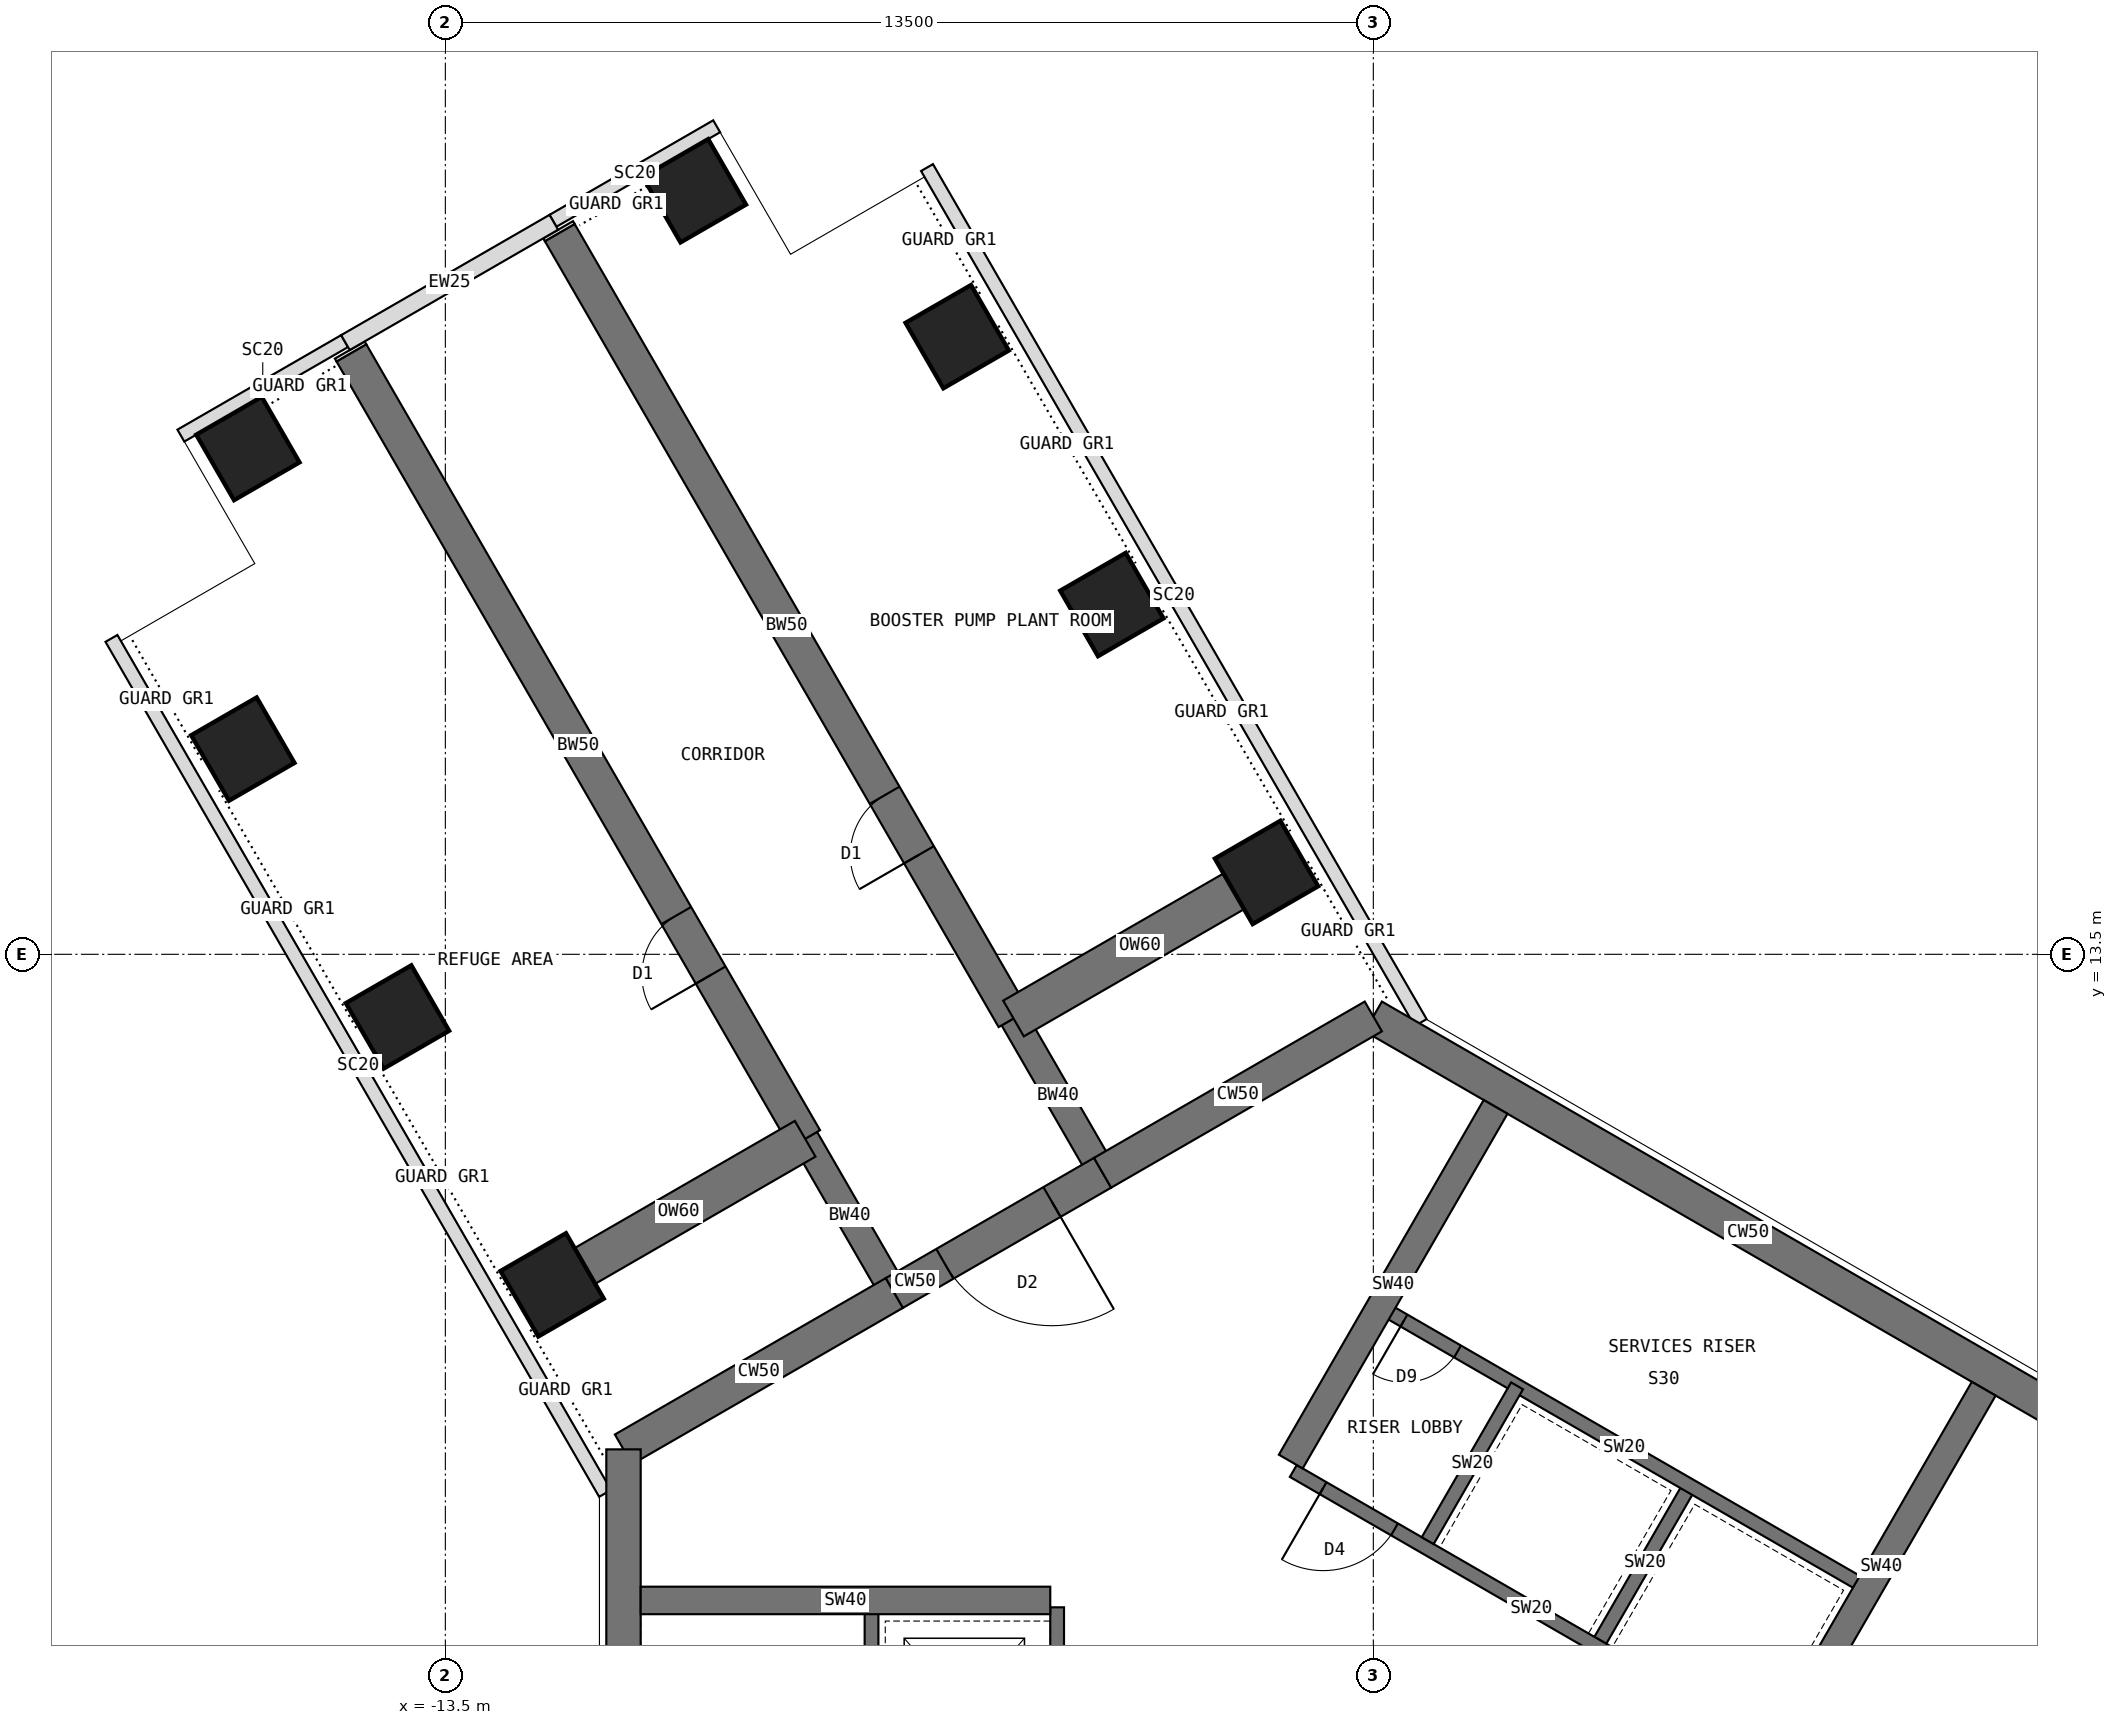
"""IFC4 building model, lengths in metres.
Left out: names, types, materials, properties, quantities, classifications, styles, units other than length and angle.
Written with IfcOpenShell. Run it as: python <this file> out.ifc"""

import sys

from ifc_helpers import new_model, si_unit, direction, frame, frame_2d, origin, origin_2d, place, context, subcontext, project, spatial, rectangle, extrude, element, fill, save


model = new_model("IFC4")
c1 = context("Model", 3, precision=1e-05, world=origin(), true_north=direction((0.0, 1.0)))
c2 = subcontext(c1, "Body", "Model", "MODEL_VIEW")
j1 = project(units=[si_unit("LENGTHUNIT", "METRE"), si_unit("PLANEANGLEUNIT", "RADIAN")], contexts=[c1])
p1 = place(None, origin())
s1 = spatial("IfcSite", under=j1, at=p1, CompositionType="ELEMENT")
p2 = place(p1, origin())
s2 = spatial("IfcBuilding", under=s1, at=p2, CompositionType="ELEMENT")
p3 = place(p2, frame((0.0, 0.0, 238.5)))
s3 = spatial("IfcBuildingStorey", under=s2, at=p3, CompositionType="ELEMENT", Elevation=238.5)
p4 = place(p3, frame((10.908, 6.298, 0.0), z_axis=(0.0, 0.0, 1.0), x_axis=(-0.866021940709, 0.500005998175, 0.0)))
e1 = element("IfcWall", 1, at=p4, inside=s3, PredefinedType="SHEAR", context=c2, shape_type="SweptSolid", body=[
    extrude(rectangle(XDim=12.596, YDim=0.5, at=frame_2d((6.298, 0.0))), origin(), (0.0, 0.0, 1.0), 5.0),
])
p5 = place(p3, frame((0.0, 12.596, 0.0), z_axis=(0.0, 0.0, 1.0), x_axis=(-0.866011268655, -0.500024481964, 0.0)))
e2 = element("IfcWall", 2, at=p5, inside=s3, PredefinedType="SHEAR", context=c2, shape_type="SweptSolid", body=[
    extrude(rectangle(XDim=4.548, YDim=0.5, at=frame_2d((2.274, 0.0))), origin(), (0.0, 0.0, 1.0), 5.0),
])
p6 = place(p3, frame((-3.939, 10.322, 0.0), z_axis=(0.0, 0.0, 1.0), x_axis=(-0.866019471182, -0.500010275428, 0.0)))
e3 = element("IfcWall", 3, at=p6, inside=s3, PredefinedType="SHEAR", context=c2, shape_type="SweptSolid", body=[
    extrude(rectangle(XDim=3.5, YDim=0.5, at=frame_2d((1.75, 0.0))), origin(), (0.0, 0.0, 1.0), 5.0),
])
p7 = place(p6, frame((0.85, 0.0, 0.0)))
e4 = element("IfcOpeningElement", 4, at=p7, cuts=e3, PredefinedType="OPENING", context=c2, shape_type="SweptSolid", body=[
    extrude(rectangle(XDim=1.8, YDim=2.1, at=frame_2d((0.9, 1.05))), frame((0.0, 0.26, 0.0), z_axis=(0.0, -1.0, 0.0), x_axis=(1.0, 0.0, 0.0)), (0.0, 0.0, 1.0), 0.52),
])
p8 = place(p3, frame((-6.97, 8.572, 0.0), z_axis=(0.0, 0.0, 1.0), x_axis=(-0.866034513004, -0.499984222037, 0.0)))
e5 = element("IfcWall", 5, at=p8, inside=s3, PredefinedType="SHEAR", context=c2, shape_type="SweptSolid", body=[
    extrude(rectangle(XDim=4.548, YDim=0.5, at=frame_2d((2.274, 0.0))), origin(), (0.0, 0.0, 1.0), 5.0),
])
p9 = place(p3, frame((-10.908, 6.298, 0.0), z_axis=(0.0, 0.0, 1.0), x_axis=(0.0, -1.0, 0.0)))
e6 = element("IfcWall", 6, at=p9, inside=s3, PredefinedType="SHEAR", context=c2, shape_type="SweptSolid", body=[
    extrude(rectangle(XDim=12.596, YDim=0.5, at=frame_2d((6.298, 0.0))), origin(), (0.0, 0.0, 1.0), 5.0),
])
p10 = place(p3, frame((-6.97, 8.572, 0.0), z_axis=(0.0, 0.0, 1.0), x_axis=(-0.499988811324, 0.866031863473, 0.0)))
e7 = element("IfcWall", 7, at=p10, inside=s3, PredefinedType="SHEAR", context=c2, shape_type="SweptSolid", body=[
    extrude(rectangle(XDim=2.592, YDim=0.4, at=frame_2d((1.296, 0.0))), origin(), (0.0, 0.0, 1.0), 5.0),
])
p11 = place(p3, frame((-8.266, 10.816, 0.0), z_axis=(0.0, 0.0, 1.0), x_axis=(-0.499996231654, 0.866027579429, 0.0)))
e8 = element("IfcWall", 8, at=p11, inside=s3, PredefinedType="SHEAR", context=c2, shape_type="SweptSolid", body=[
    extrude(rectangle(XDim=13.2, YDim=0.5, at=frame_2d((6.6, 0.0))), origin(), (0.0, 0.0, 1.0), 5.0),
])
p12 = place(p11, frame((2.75, 0.0, 0.0)))
e9 = element("IfcOpeningElement", 9, at=p12, cuts=e8, PredefinedType="OPENING", context=c2, shape_type="SweptSolid", body=[
    extrude(rectangle(XDim=1.0, YDim=2.1, at=frame_2d((0.5, 1.05))), frame((0.0, 0.26, 0.0), z_axis=(0.0, -1.0, 0.0), x_axis=(1.0, 0.0, 0.0)), (0.0, 0.0, 1.0), 0.52),
])
p13 = place(p3, frame((-3.939, 10.322, 0.0), z_axis=(0.0, 0.0, 1.0), x_axis=(-0.499918158782, 0.866072649678, 0.0)))
e10 = element("IfcWall", 10, at=p13, inside=s3, PredefinedType="SHEAR", context=c2, shape_type="SweptSolid", body=[
    extrude(rectangle(XDim=2.592, YDim=0.4, at=frame_2d((1.296, 0.0))), origin(), (0.0, 0.0, 1.0), 5.0),
])
p14 = place(p3, frame((-5.234, 12.566, 0.0), z_axis=(0.0, 0.0, 1.0), x_axis=(-0.500010103361, 0.866019570528, 0.0)))
e11 = element("IfcWall", 11, at=p14, inside=s3, PredefinedType="SHEAR", context=c2, shape_type="SweptSolid", body=[
    extrude(rectangle(XDim=13.2, YDim=0.5, at=frame_2d((6.6, 0.0))), origin(), (0.0, 0.0, 1.0), 5.0),
])
p15 = place(p14, frame((2.75, 0.0, 0.0)))
e12 = element("IfcOpeningElement", 12, at=p15, cuts=e11, PredefinedType="OPENING", context=c2, shape_type="SweptSolid", body=[
    extrude(rectangle(XDim=1.0, YDim=2.1, at=frame_2d((0.5, 1.05))), frame((0.0, 0.26, 0.0), z_axis=(0.0, -1.0, 0.0), x_axis=(1.0, 0.0, 0.0)), (0.0, 0.0, 1.0), 0.52),
])
for number, where, z_axis, x_axis in (
    (13, (-11.946, 8.691, 0.0), (0.0, 0.0, 1.0), (0.866, 0.5, 0.0)),
    (14, (-1.554, 14.691, 0.0), (0.0, 0.0, 1.0), (0.866, 0.5, 0.0)),
    (15, (-14.196, 12.588, 0.0), (0.0, 0.0, 1.0), (0.866, 0.5, 0.0)),
    (16, (-3.804, 18.588, 0.0), (0.0, 0.0, 1.0), (0.866, 0.5, 0.0)),
    (17, (-16.446, 16.486, 0.0), (0.0, 0.0, 1.0), (0.866, 0.5, 0.0)),
    (18, (-6.054, 22.486, 0.0), (0.0, 0.0, 1.0), (0.866, 0.5, 0.0)),
    (19, (-16.373, 20.858, 0.0), (0.0, 0.0, 1.0), (0.866, 0.5, 0.0)),
    (20, (-9.877, 24.608, 0.0), (0.0, 0.0, 1.0), (0.866, 0.5, 0.0)),
):
    element("IfcColumn", number, at=place(p3, frame(where, z_axis=z_axis, x_axis=x_axis)), inside=s3, PredefinedType="COLUMN", context=c2, shape_type="SweptSolid", body=[
        extrude(rectangle(XDim=1.1, YDim=1.1, at=origin_2d()), origin(), (0.0, 0.0, 1.0), 5.0),
    ])
for number, where, z_axis, x_axis in (
    (21, (-8.266, 10.816, 0.0), (0.0, 0.0, 1.0), (-0.866, -0.5, 0.0)),
    (22, (-5.234, 12.566, 0.0), (0.0, 0.0, 1.0), (0.866, 0.5, 0.0)),
):
    element("IfcWall", number, at=place(p3, frame(where, z_axis=z_axis, x_axis=x_axis)), inside=s3, PredefinedType="SHEAR", context=c2, shape_type="SweptSolid", body=[
        extrude(rectangle(XDim=4.25, YDim=0.6, at=frame_2d((2.125, 0.0))), origin(), (0.0, 0.0, 1.0), 5.0),
    ])
p16 = place(p3, frame((-11.176, 5.657, 0.0), z_axis=(0.0, 0.0, 1.0), x_axis=(-0.500002020472, 0.866024237261, 0.0)))
e23 = element("IfcWall", 23, at=p16, inside=s3, PredefinedType="USERDEFINED", context=c2, shape_type="SweptSolid", body=[
    extrude(rectangle(XDim=14.363, YDim=0.2, at=frame_2d((7.181, 0.0))), origin(), (0.0, 0.0, 1.0), 4.8),
])
p17 = place(p3, frame((-6.493, 24.946, 0.0), z_axis=(0.0, 0.0, 1.0), x_axis=(0.499994660107, -0.866028486751, 0.0)))
e24 = element("IfcWall", 24, at=p17, inside=s3, PredefinedType="USERDEFINED", context=c2, shape_type="SweptSolid", body=[
    extrude(rectangle(XDim=14.363, YDim=0.2, at=frame_2d((7.182, 0.0))), origin(), (0.0, 0.0, 1.0), 4.8),
])
p18 = place(p3, frame((-9.553, 25.546, 0.0), z_axis=(0.0, 0.0, 1.0), x_axis=(-0.866027397988, -0.499996545922, 0.0)))
e25 = element("IfcWall", 25, at=p18, inside=s3, PredefinedType="USERDEFINED", context=c2, shape_type="SweptSolid", body=[
    extrude(rectangle(XDim=2.75, YDim=0.2, at=frame_2d((1.375, 0.0))), origin(), (0.0, 0.0, 1.0), 4.8),
])
p19 = place(p3, frame((-11.922, 24.149, 0.0), z_axis=(0.0, 0.0, 1.0), x_axis=(-0.866036909293, -0.499980071345, 0.0)))
e26 = element("IfcWall", 26, at=p19, inside=s3, PredefinedType="STANDARD", context=c2, shape_type="SweptSolid", body=[
    extrude(rectangle(XDim=3.5, YDim=0.25, at=frame_2d((1.75, 0.0))), origin(), (0.0, 0.0, 1.0), 4.8),
])
p20 = place(p3, frame((-14.966, 22.421, 0.0), z_axis=(0.0, 0.0, 1.0), x_axis=(-0.866027397988, -0.499996545922, 0.0)))
e27 = element("IfcWall", 27, at=p20, inside=s3, PredefinedType="USERDEFINED", context=c2, shape_type="SweptSolid", body=[
    extrude(rectangle(XDim=2.75, YDim=0.2, at=frame_2d((1.375, 0.0))), origin(), (0.0, 0.0, 1.0), 4.8),
])
p21 = place(p3, frame((-14.865, 22.248, 0.0), z_axis=(0.0, 0.0, 1.0), x_axis=(-0.500844580232, 0.86553723574, 0.0)))
e28 = element("IfcWall", 28, at=p21, inside=s3, PredefinedType="PARTITIONING", context=c2, shape_type="SweptSolid", body=[
    extrude(rectangle(XDim=0.05, YDim=0.5, at=frame_2d((0.025, 0.0))), origin(), (0.0, 0.0, 1.0), 4.8),
])
p22 = place(p3, frame((-11.834, 23.998, 0.0), z_axis=(0.0, 0.0, 1.0), x_axis=(-0.497188445666, 0.867642581652, 0.0)))
e29 = element("IfcWall", 29, at=p22, inside=s3, PredefinedType="PARTITIONING", context=c2, shape_type="SweptSolid", body=[
    extrude(rectangle(XDim=0.05, YDim=0.5, at=frame_2d((0.025, 0.0))), origin(), (0.0, 0.0, 1.0), 4.8),
])
p23 = place(p3, frame((5.764, 1.984, 0.0), z_axis=(0.0, 0.0, 1.0), x_axis=(-0.866026010844, 0.49999894854, 0.0)))
e30 = element("IfcWall", 30, at=p23, inside=s3, PredefinedType="SHEAR", context=c2, shape_type="SweptSolid", body=[
    extrude(rectangle(XDim=8.0, YDim=0.2, at=frame_2d((4.0, 0.0))), origin(), (0.0, 0.0, 1.0), 5.0),
])
p24 = place(p23, frame((6.3, 0.0, 0.0)))
e31 = element("IfcOpeningElement", 31, at=p24, cuts=e30, PredefinedType="OPENING", context=c2, shape_type="SweptSolid", body=[
    extrude(rectangle(XDim=1.2, YDim=2.1, at=frame_2d((0.6, 1.05))), frame((0.0, 0.11, 0.0), z_axis=(0.0, -1.0, 0.0), x_axis=(1.0, 0.0, 0.0)), (0.0, 0.0, 1.0), 0.22),
])
for number, where, z_axis, x_axis in (
    (32, (3.303, 3.52, 0.0), (0.0, 0.0, 1.0), (0.5, 0.866, 0.0)),
    (33, (0.791, 4.97, 0.0), (0.0, 0.0, 1.0), (0.5, 0.866, 0.0)),
):
    element("IfcWall", number, at=place(p3, frame(where, z_axis=z_axis, x_axis=x_axis)), inside=s3, PredefinedType="SHEAR", context=c2, shape_type="SweptSolid", body=[
        extrude(rectangle(XDim=2.6, YDim=0.2, at=frame_2d((1.3, 0.0))), origin(), (0.0, 0.0, 1.0), 5.0),
    ])
p25 = place(p3, frame((7.114, 4.322, 0.0), z_axis=(0.0, 0.0, 1.0), x_axis=(-0.866026010844, 0.49999894854, 0.0)))
e34 = element("IfcWall", 34, at=p25, inside=s3, PredefinedType="SHEAR", context=c2, shape_type="SweptSolid", body=[
    extrude(rectangle(XDim=8.0, YDim=0.2, at=frame_2d((4.0, 0.0))), origin(), (0.0, 0.0, 1.0), 5.0),
])
p26 = place(p25, frame((6.8, 0.0, 0.0)))
e35 = element("IfcOpeningElement", 35, at=p26, cuts=e34, PredefinedType="OPENING", context=c2, shape_type="SweptSolid", body=[
    extrude(rectangle(XDim=0.9, YDim=2.1, at=frame_2d((0.45, 1.05))), frame((0.0, 0.11, 0.0), z_axis=(0.0, -1.0, 0.0), x_axis=(1.0, 0.0, 0.0)), (0.0, 0.0, 1.0), 0.22),
])
p27 = place(p3, frame((-1.201, 6.12, 0.0), z_axis=(0.0, 0.0, 1.0), x_axis=(0.500021575205, 0.866012946976, 0.0)))
e36 = element("IfcWall", 36, at=p27, inside=s3, PredefinedType="SHEAR", context=c2, shape_type="SweptSolid", body=[
    extrude(rectangle(XDim=5.958, YDim=0.4, at=frame_2d((2.979, 0.0))), origin(), (0.0, 0.0, 1.0), 5.0),
])
p28 = place(p3, frame((5.901, 2.02, 0.0), z_axis=(0.0, 0.0, 1.0), x_axis=(0.500003832394, 0.86602319114, 0.0)))
e37 = element("IfcWall", 37, at=p28, inside=s3, PredefinedType="SHEAR", context=c2, shape_type="SweptSolid", body=[
    extrude(rectangle(XDim=5.958, YDim=0.4, at=frame_2d((2.979, 0.0))), origin(), (0.0, 0.0, 1.0), 5.0),
])
p29 = place(p3, frame((-4.6, 4.0, 0.0), z_axis=(0.0, 0.0, 1.0), x_axis=(0.0, -1.0, 0.0)))
e38 = element("IfcWall", 38, at=p29, inside=s3, PredefinedType="SHEAR", context=c2, shape_type="SweptSolid", body=[
    extrude(rectangle(XDim=8.0, YDim=0.2, at=frame_2d((4.0, 0.0))), origin(), (0.0, 0.0, 1.0), 5.0),
])
p30 = place(p29, frame((6.3, 0.0, 0.0)))
e39 = element("IfcOpeningElement", 39, at=p30, cuts=e38, PredefinedType="OPENING", context=c2, shape_type="SweptSolid", body=[
    extrude(rectangle(XDim=1.2, YDim=2.1, at=frame_2d((0.6, 1.05))), frame((0.0, 0.11, 0.0), z_axis=(0.0, -1.0, 0.0), x_axis=(1.0, 0.0, 0.0)), (0.0, 0.0, 1.0), 0.22),
])
p31 = place(p29, frame((0.9, 0.0, 0.0)))
e40 = element("IfcOpeningElement", 40, at=p31, cuts=e38, PredefinedType="OPENING", context=c2, shape_type="SweptSolid", body=[
    extrude(rectangle(XDim=1.1, YDim=2.2, at=frame_2d((0.55, 1.1))), frame((0.0, 0.11, 0.0), z_axis=(0.0, -1.0, 0.0), x_axis=(1.0, 0.0, 0.0)), (0.0, 0.0, 1.0), 0.22),
])
p32 = place(p3, frame((-7.3, 4.0, 0.0), z_axis=(0.0, 0.0, 1.0), x_axis=(0.0, -1.0, 0.0)))
e41 = element("IfcWall", 41, at=p32, inside=s3, PredefinedType="SHEAR", context=c2, shape_type="SweptSolid", body=[
    extrude(rectangle(XDim=8.0, YDim=0.2, at=frame_2d((4.0, 0.0))), origin(), (0.0, 0.0, 1.0), 5.0),
])
p33 = place(p32, frame((6.7, 0.0, 0.0)))
e42 = element("IfcOpeningElement", 42, at=p33, cuts=e41, PredefinedType="OPENING", context=c2, shape_type="SweptSolid", body=[
    extrude(rectangle(XDim=1.1, YDim=2.1, at=frame_2d((0.55, 1.05))), frame((0.0, 0.11, 0.0), z_axis=(0.0, -1.0, 0.0), x_axis=(1.0, 0.0, 0.0)), (0.0, 0.0, 1.0), 0.22),
])
p34 = place(p3, frame((-4.7, 4.1, 0.0), z_axis=(0.0, 0.0, 1.0), x_axis=(-1.0, 0.0, 0.0)))
e43 = element("IfcWall", 43, at=p34, inside=s3, PredefinedType="SHEAR", context=c2, shape_type="SweptSolid", body=[
    extrude(rectangle(XDim=5.958, YDim=0.4, at=frame_2d((2.979, 0.0))), origin(), (0.0, 0.0, 1.0), 5.0),
])
p35 = place(p24, origin())
e44 = element("IfcDoor", 44, at=p35, inside=s3, OperationType="SINGLE_SWING_RIGHT", PredefinedType="DOOR", context=c2, shape_type="SweptSolid", body=[
    extrude(rectangle(XDim=1.2, YDim=2.1, at=frame_2d((0.6, 1.05))), frame((0.0, 0.025, 0.0), z_axis=(0.0, -1.0, 0.0), x_axis=(1.0, 0.0, 0.0)), (0.0, 0.0, 1.0), 0.05),
])
fill(e31, e44)
p36 = place(p26, origin())
e45 = element("IfcDoor", 45, at=p36, inside=s3, OperationType="SINGLE_SWING_RIGHT", PredefinedType="DOOR", context=c2, shape_type="SweptSolid", body=[
    extrude(rectangle(XDim=0.9, YDim=2.1, at=frame_2d((0.45, 1.05))), frame((0.0, 0.025, 0.0), z_axis=(0.0, -1.0, 0.0), x_axis=(1.0, 0.0, 0.0)), (0.0, 0.0, 1.0), 0.05),
])
fill(e35, e45)
p37 = place(p7, origin())
e46 = element("IfcDoor", 46, at=p37, inside=s3, OperationType="DOUBLE_DOOR_DOUBLE_SWING", PredefinedType="DOOR", context=c2, shape_type="SweptSolid", body=[
    extrude(rectangle(XDim=1.8, YDim=2.1, at=frame_2d((0.9, 1.05))), frame((0.0, 0.025, 0.0), z_axis=(0.0, -1.0, 0.0), x_axis=(1.0, 0.0, 0.0)), (0.0, 0.0, 1.0), 0.05),
])
fill(e4, e46)
p38 = place(p12, origin())
e47 = element("IfcDoor", 47, at=p38, inside=s3, OperationType="SINGLE_SWING_LEFT", PredefinedType="DOOR", context=c2, shape_type="SweptSolid", body=[
    extrude(rectangle(XDim=1.0, YDim=2.1, at=frame_2d((0.5, 1.05))), frame((0.0, 0.025, 0.0), z_axis=(0.0, -1.0, 0.0), x_axis=(1.0, 0.0, 0.0)), (0.0, 0.0, 1.0), 0.05),
])
fill(e9, e47)
p39 = place(p15, origin())
e48 = element("IfcDoor", 48, at=p39, inside=s3, OperationType="SINGLE_SWING_LEFT", PredefinedType="DOOR", context=c2, shape_type="SweptSolid", body=[
    extrude(rectangle(XDim=1.0, YDim=2.1, at=frame_2d((0.5, 1.05))), frame((0.0, 0.025, 0.0), z_axis=(0.0, -1.0, 0.0), x_axis=(1.0, 0.0, 0.0)), (0.0, 0.0, 1.0), 0.05),
])
fill(e12, e48)
save(model, sys.argv[1])
